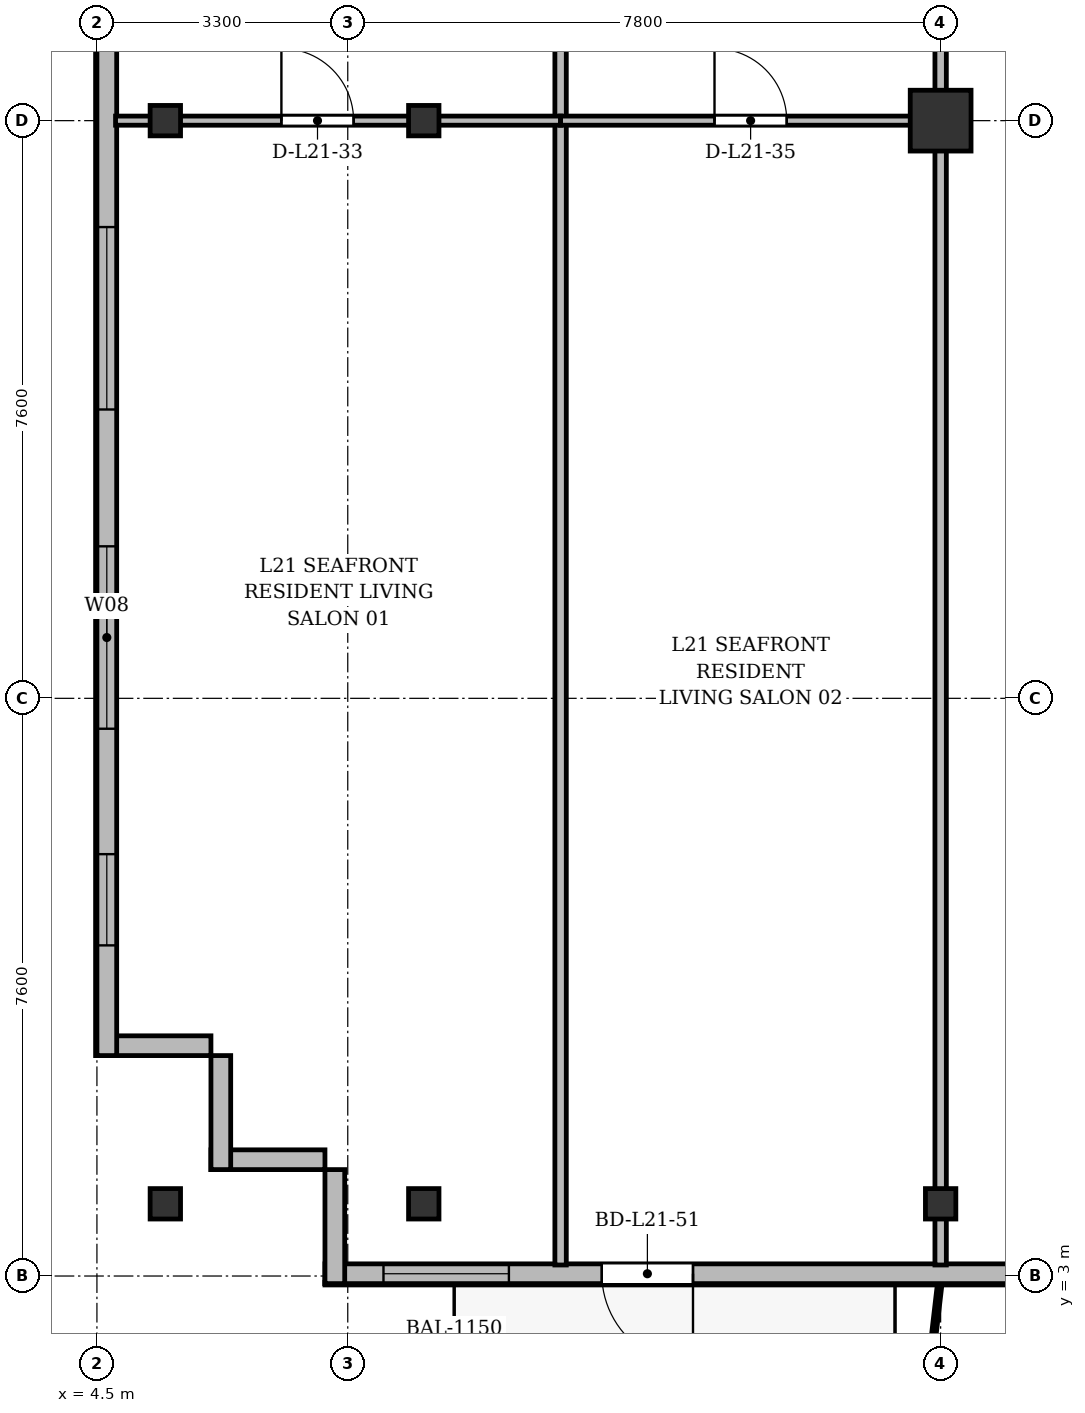
"""IFC4 building model, lengths in metres.
Left out: names, types, materials, properties, quantities, classifications, styles, units other than length and angle.
Written with IfcOpenShell. Run it as: python <this file> out.ifc"""

import sys

from ifc_helpers import new_model, si_unit, direction, frame, frame_2d, origin, origin_2d, place, context, subcontext, project, spatial, rectangle, i_section, extrude, source, transform, mapped, element, fill, save


model = new_model("IFC4")
c1 = context("Model", 3, precision=1e-05, world=origin(), true_north=direction((0.0, 1.0)))
c2 = subcontext(c1, "Body", "Model", "MODEL_VIEW")
j1 = project(units=[si_unit("LENGTHUNIT", "METRE"), si_unit("PLANEANGLEUNIT", "RADIAN")], contexts=[c1])
p1 = place(None, origin())
s1 = spatial("IfcSite", under=j1, at=p1, CompositionType="ELEMENT")
p2 = place(p1, origin())
s2 = spatial("IfcBuilding", under=s1, at=p2, CompositionType="ELEMENT")
p3 = place(p2, frame((0.0, 0.0, 85.3)))
s3 = spatial("IfcBuildingStorey", under=s2, at=p3, CompositionType="ELEMENT", Elevation=85.3)
m1 = source(origin(), c2, "Body", "SweptSolid", [
    extrude(i_section(OverallWidth=0.4, OverallDepth=0.4, WebThickness=0.022, FlangeThickness=0.035, at=origin_2d()), origin(), (0.0, 0.0, 1.0), 3.6),
])
for number, where, z_axis, x_axis in (
    (1, (5.4, 3.95, 0.0), (0.0, 0.0, 1.0), (1.0, 0.0, 0.0)),
    (2, (5.4, 18.2, 0.0), (0.0, 0.0, 1.0), (1.0, 0.0, 0.0)),
    (3, (8.8, 3.95, 0.0), (0.0, 0.0, 1.0), (1.0, 0.0, 0.0)),
    (4, (8.8, 18.2, 0.0), (0.0, 0.0, 1.0), (1.0, 0.0, 0.0)),
    (5, (15.6, 3.95, 0.0), (0.0, 0.0, 1.0), (1.0, 0.0, 0.0)),
):
    element("IfcColumn", number, at=place(p3, frame(where, z_axis=z_axis, x_axis=x_axis)), inside=s3, PredefinedType="COLUMN", context=c2, shape_type="MappedRepresentation", body=[
        mapped(m1, transform((0.0, 0.0, 0.0), x_axis=(1.0, 0.0, 0.0), y_axis=(0.0, 1.0, 0.0), z_axis=(0.0, 0.0, 1.0), scale=1.0)),
    ])
m2 = source(origin(), c2, "Body", "SweptSolid", [
    extrude(rectangle(XDim=0.8, YDim=0.8, at=origin_2d()), origin(), (0.0, 0.0, 1.0), 3.6),
])
p4 = place(p3, frame((15.6, 18.2, 0.0), z_axis=(0.0, 0.0, 1.0), x_axis=(1.0, 0.0, 0.0)))
e6 = element("IfcColumn", 6, at=p4, inside=s3, PredefinedType="COLUMN", context=c2, shape_type="MappedRepresentation", body=[
    mapped(m2, transform((0.0, 0.0, 0.0), x_axis=(1.0, 0.0, 0.0), y_axis=(0.0, 1.0, 0.0), z_axis=(0.0, 0.0, 1.0), scale=1.0)),
])
for number, where, z_axis, x_axis in (
    (7, (7.5, 4.53, 0.0), (0.0, 0.0, 1.0), (-1.0, 0.0, 0.0)),
    (8, (6.13, 4.4, 0.0), (0.0, 0.0, 1.0), (0.0, 1.0, 0.0)),
):
    element("IfcWall", number, at=place(p3, frame(where, z_axis=z_axis, x_axis=x_axis)), inside=s3, PredefinedType="SOLIDWALL", context=c2, shape_type="SweptSolid", body=[
        extrude(rectangle(XDim=1.5, YDim=0.26, at=frame_2d((0.75, 0.0))), origin(), (0.0, 0.0, 1.0), 3.34),
    ])
p5 = place(p3, frame((6.0, 6.03, 0.0), z_axis=(0.0, 0.0, 1.0), x_axis=(-1.0, 0.0, 0.0)))
e9 = element("IfcWall", 9, at=p5, inside=s3, PredefinedType="SOLIDWALL", context=c2, shape_type="SweptSolid", body=[
    extrude(rectangle(XDim=1.5, YDim=0.26, at=frame_2d((0.75, 0.0))), origin(), (0.0, 0.0, 1.0), 2.84),
])
p6 = place(p3, frame((4.63, 5.9, 0.0), z_axis=(0.0, 0.0, 1.0), x_axis=(0.0, 1.0, 0.0)))
e10 = element("IfcWall", 10, at=p6, inside=s3, PredefinedType="SOLIDWALL", context=c2, shape_type="SweptSolid", body=[
    extrude(rectangle(XDim=39.6, YDim=0.26, at=frame_2d((19.8, 0.0))), origin(), (0.0, 0.0, 1.0), 3.34),
])
p7 = place(p6, frame((1.45, 0.0, 0.92)))
e11 = element("IfcOpeningElement", 11, at=p7, cuts=e10, PredefinedType="OPENING", context=c2, shape_type="SweptSolid", body=[
    extrude(rectangle(XDim=1.2, YDim=1.65, at=frame_2d((0.6, 0.825))), frame((0.0, 0.14, 0.0), z_axis=(0.0, -1.0, 0.0), x_axis=(1.0, 0.0, 0.0)), (0.0, 0.0, 1.0), 0.28),
])
p8 = place(p6, frame((4.3, 0.0, 0.92)))
e12 = element("IfcOpeningElement", 12, at=p8, cuts=e10, PredefinedType="OPENING", context=c2, shape_type="SweptSolid", body=[
    extrude(rectangle(XDim=2.4, YDim=2.1, at=frame_2d((1.2, 1.05))), frame((0.0, 0.14, 0.0), z_axis=(0.0, -1.0, 0.0), x_axis=(1.0, 0.0, 0.0)), (0.0, 0.0, 1.0), 0.28),
])
p9 = place(p6, frame((8.5, 0.0, 0.92)))
e13 = element("IfcOpeningElement", 13, at=p9, cuts=e10, PredefinedType="OPENING", context=c2, shape_type="SweptSolid", body=[
    extrude(rectangle(XDim=2.4, YDim=2.1, at=frame_2d((1.2, 1.05))), frame((0.0, 0.14, 0.0), z_axis=(0.0, -1.0, 0.0), x_axis=(1.0, 0.0, 0.0)), (0.0, 0.0, 1.0), 0.28),
])
p10 = place(p6, frame((15.7, 0.0, 0.92)))
e14 = element("IfcOpeningElement", 14, at=p10, cuts=e10, PredefinedType="OPENING", context=c2, shape_type="SweptSolid", body=[
    extrude(rectangle(XDim=2.4, YDim=2.1, at=frame_2d((1.2, 1.05))), frame((0.0, 0.14, 0.0), z_axis=(0.0, -1.0, 0.0), x_axis=(1.0, 0.0, 0.0)), (0.0, 0.0, 1.0), 0.28),
])
p11 = place(p6, frame((29.7, 0.0, 0.92)))
e15 = element("IfcOpeningElement", 15, at=p11, cuts=e10, PredefinedType="OPENING", context=c2, shape_type="SweptSolid", body=[
    extrude(rectangle(XDim=2.4, YDim=2.1, at=frame_2d((1.2, 1.05))), frame((0.0, 0.14, 0.0), z_axis=(0.0, -1.0, 0.0), x_axis=(1.0, 0.0, 0.0)), (0.0, 0.0, 1.0), 0.28),
])
p12 = place(p6, frame((37.25, 0.0, 0.92)))
e16 = element("IfcOpeningElement", 16, at=p12, cuts=e10, PredefinedType="OPENING", context=c2, shape_type="SweptSolid", body=[
    extrude(rectangle(XDim=1.2, YDim=1.65, at=frame_2d((0.6, 0.825))), frame((0.0, 0.14, 0.0), z_axis=(0.0, -1.0, 0.0), x_axis=(1.0, 0.0, 0.0)), (0.0, 0.0, 1.0), 0.28),
])
p13 = place(p3, frame((66.9, 3.03, 0.0), z_axis=(0.0, 0.0, 1.0), x_axis=(-1.0, 0.0, 0.0)))
e17 = element("IfcWall", 17, at=p13, inside=s3, PredefinedType="SOLIDWALL", context=c2, shape_type="SweptSolid", body=[
    extrude(rectangle(XDim=59.4, YDim=0.26, at=frame_2d((29.7, 0.0))), origin(), (0.0, 0.0, 1.0), 3.34),
])
p14 = place(p13, frame((0.595, 0.0, 0.9)))
e18 = element("IfcOpeningElement", 18, at=p14, cuts=e17, PredefinedType="OPENING", context=c2, shape_type="SweptSolid", body=[
    extrude(rectangle(XDim=2.2, YDim=1.8, at=frame_2d((1.1, 0.9))), frame((0.0, 0.14, 0.0), z_axis=(0.0, -1.0, 0.0), x_axis=(1.0, 0.0, 0.0)), (0.0, 0.0, 1.0), 0.28),
])
p15 = place(p13, frame((4.95, 0.0, 0.9)))
e19 = element("IfcOpeningElement", 19, at=p15, cuts=e17, PredefinedType="OPENING", context=c2, shape_type="SweptSolid", body=[
    extrude(rectangle(XDim=1.5, YDim=1.75, at=frame_2d((0.75, 0.875))), frame((0.0, 0.14, 0.0), z_axis=(0.0, -1.0, 0.0), x_axis=(1.0, 0.0, 0.0)), (0.0, 0.0, 1.0), 0.28),
])
p16 = place(p13, frame((9.18, 0.0, 0.0)))
e20 = element("IfcOpeningElement", 20, at=p16, cuts=e17, PredefinedType="OPENING", context=c2, shape_type="SweptSolid", body=[
    extrude(rectangle(XDim=1.2, YDim=2.2, at=frame_2d((0.6, 1.1))), frame((0.0, 0.14, 0.0), z_axis=(0.0, -1.0, 0.0), x_axis=(1.0, 0.0, 0.0)), (0.0, 0.0, 1.0), 0.28),
])
p17 = place(p13, frame((13.125, 0.0, 0.9)))
e21 = element("IfcOpeningElement", 21, at=p17, cuts=e17, PredefinedType="OPENING", context=c2, shape_type="SweptSolid", body=[
    extrude(rectangle(XDim=1.65, YDim=1.85, at=frame_2d((0.825, 0.925))), frame((0.0, 0.14, 0.0), z_axis=(0.0, -1.0, 0.0), x_axis=(1.0, 0.0, 0.0)), (0.0, 0.0, 1.0), 0.28),
])
p18 = place(p13, frame((16.2, 0.0, 0.9)))
e22 = element("IfcOpeningElement", 22, at=p18, cuts=e17, PredefinedType="OPENING", context=c2, shape_type="SweptSolid", body=[
    extrude(rectangle(XDim=1.8, YDim=1.8, at=frame_2d((0.9, 0.9))), frame((0.0, 0.14, 0.0), z_axis=(0.0, -1.0, 0.0), x_axis=(1.0, 0.0, 0.0)), (0.0, 0.0, 1.0), 0.28),
])
p19 = place(p13, frame((18.75, 0.0, 0.9)))
e23 = element("IfcOpeningElement", 23, at=p19, cuts=e17, PredefinedType="OPENING", context=c2, shape_type="SweptSolid", body=[
    extrude(rectangle(XDim=1.5, YDim=1.75, at=frame_2d((0.75, 0.875))), frame((0.0, 0.14, 0.0), z_axis=(0.0, -1.0, 0.0), x_axis=(1.0, 0.0, 0.0)), (0.0, 0.0, 1.0), 0.28),
])
p20 = place(p13, frame((21.15, 0.0, 0.9)))
e24 = element("IfcOpeningElement", 24, at=p20, cuts=e17, PredefinedType="OPENING", context=c2, shape_type="SweptSolid", body=[
    extrude(rectangle(XDim=1.5, YDim=1.75, at=frame_2d((0.75, 0.875))), frame((0.0, 0.14, 0.0), z_axis=(0.0, -1.0, 0.0), x_axis=(1.0, 0.0, 0.0)), (0.0, 0.0, 1.0), 0.28),
])
p21 = place(p13, frame((23.85, 0.0, 0.9)))
e25 = element("IfcOpeningElement", 25, at=p21, cuts=e17, PredefinedType="OPENING", context=c2, shape_type="SweptSolid", body=[
    extrude(rectangle(XDim=2.0, YDim=1.95, at=frame_2d((1.0, 0.975))), frame((0.0, 0.14, 0.0), z_axis=(0.0, -1.0, 0.0), x_axis=(1.0, 0.0, 0.0)), (0.0, 0.0, 1.0), 0.28),
])
p22 = place(p13, frame((27.525, 0.0, 0.9)))
e26 = element("IfcOpeningElement", 26, at=p22, cuts=e17, PredefinedType="OPENING", context=c2, shape_type="SweptSolid", body=[
    extrude(rectangle(XDim=1.65, YDim=1.85, at=frame_2d((0.825, 0.925))), frame((0.0, 0.14, 0.0), z_axis=(0.0, -1.0, 0.0), x_axis=(1.0, 0.0, 0.0)), (0.0, 0.0, 1.0), 0.28),
])
p23 = place(p13, frame((32.3, 0.0, 0.9)))
e27 = element("IfcOpeningElement", 27, at=p23, cuts=e17, PredefinedType="OPENING", context=c2, shape_type="SweptSolid", body=[
    extrude(rectangle(XDim=1.8, YDim=1.8, at=frame_2d((0.9, 0.9))), frame((0.0, 0.14, 0.0), z_axis=(0.0, -1.0, 0.0), x_axis=(1.0, 0.0, 0.0)), (0.0, 0.0, 1.0), 0.28),
])
p24 = place(p13, frame((40.301, 0.0, 0.0)))
e28 = element("IfcOpeningElement", 28, at=p24, cuts=e17, PredefinedType="OPENING", context=c2, shape_type="SweptSolid", body=[
    extrude(rectangle(XDim=1.2, YDim=2.2, at=frame_2d((0.6, 1.1))), frame((0.0, 0.14, 0.0), z_axis=(0.0, -1.0, 0.0), x_axis=(1.0, 0.0, 0.0)), (0.0, 0.0, 1.0), 0.28),
])
p25 = place(p13, frame((46.65, 0.0, 0.9)))
e29 = element("IfcOpeningElement", 29, at=p25, cuts=e17, PredefinedType="OPENING", context=c2, shape_type="SweptSolid", body=[
    extrude(rectangle(XDim=1.5, YDim=1.75, at=frame_2d((0.75, 0.875))), frame((0.0, 0.14, 0.0), z_axis=(0.0, -1.0, 0.0), x_axis=(1.0, 0.0, 0.0)), (0.0, 0.0, 1.0), 0.28),
])
p26 = place(p13, frame((54.558, 0.0, 0.0)))
e30 = element("IfcOpeningElement", 30, at=p26, cuts=e17, PredefinedType="OPENING", context=c2, shape_type="SweptSolid", body=[
    extrude(rectangle(XDim=1.2, YDim=2.2, at=frame_2d((0.6, 1.1))), frame((0.0, 0.14, 0.0), z_axis=(0.0, -1.0, 0.0), x_axis=(1.0, 0.0, 0.0)), (0.0, 0.0, 1.0), 0.28),
])
p27 = place(p13, frame((56.98, 0.0, 0.9)))
e31 = element("IfcOpeningElement", 31, at=p27, cuts=e17, PredefinedType="OPENING", context=c2, shape_type="SweptSolid", body=[
    extrude(rectangle(XDim=1.65, YDim=1.85, at=frame_2d((0.825, 0.925))), frame((0.0, 0.14, 0.0), z_axis=(0.0, -1.0, 0.0), x_axis=(1.0, 0.0, 0.0)), (0.0, 0.0, 1.0), 0.28),
])
p28 = place(p3, frame((7.63, 2.9, 0.0), z_axis=(0.0, 0.0, 1.0), x_axis=(0.0, 1.0, 0.0)))
e32 = element("IfcWall", 32, at=p28, inside=s3, PredefinedType="SOLIDWALL", context=c2, shape_type="SweptSolid", body=[
    extrude(rectangle(XDim=1.5, YDim=0.26, at=frame_2d((0.75, 0.0))), origin(), (0.0, 0.0, 1.0), 2.752),
])
p29 = place(p3, frame((10.6, 3.145, 0.0), z_axis=(0.0, 0.0, 1.0), x_axis=(0.0, 1.0, 0.0)))
e33 = element("IfcWall", 33, at=p29, inside=s3, PredefinedType="PARTITIONING", context=c2, shape_type="SweptSolid", body=[
    extrude(rectangle(XDim=24.455, YDim=0.15, at=frame_2d((12.228, 0.0))), origin(), (0.0, 0.0, 1.0), 2.752),
])
p30 = place(p3, frame((15.6, 3.145, 0.0), z_axis=(0.0, 0.0, 1.0), x_axis=(0.0, 1.0, 0.0)))
e34 = element("IfcWall", 34, at=p30, inside=s3, PredefinedType="PARTITIONING", context=c2, shape_type="SweptSolid", body=[
    extrude(rectangle(XDim=24.455, YDim=0.15, at=frame_2d((12.228, 0.0))), origin(), (0.0, 0.0, 1.0), 2.84),
])
p31 = place(p3, frame((4.745, 18.2, 0.0), z_axis=(0.0, 0.0, 1.0), x_axis=(1.0, 0.0, 0.0)))
e35 = element("IfcWall", 35, at=p31, inside=s3, PredefinedType="PARTITIONING", context=c2, shape_type="SweptSolid", body=[
    extrude(rectangle(XDim=5.855, YDim=0.12, at=frame_2d((2.927, 0.0))), origin(), (0.0, 0.0, 1.0), 2.752),
])
p32 = place(p31, frame((2.182, 0.0, 0.0)))
e36 = element("IfcOpeningElement", 36, at=p32, cuts=e35, PredefinedType="OPENING", context=c2, shape_type="SweptSolid", body=[
    extrude(rectangle(XDim=0.95, YDim=2.15, at=frame_2d((0.475, 1.075))), frame((0.0, 0.07, 0.0), z_axis=(0.0, -1.0, 0.0), x_axis=(1.0, 0.0, 0.0)), (0.0, 0.0, 1.0), 0.14),
])
p33 = place(p3, frame((10.6, 18.2, 0.0), z_axis=(0.0, 0.0, 1.0), x_axis=(1.0, 0.0, 0.0)))
e37 = element("IfcWall", 37, at=p33, inside=s3, PredefinedType="PARTITIONING", context=c2, shape_type="SweptSolid", body=[
    extrude(rectangle(XDim=5.0, YDim=0.12, at=frame_2d((2.5, 0.0))), origin(), (0.0, 0.0, 1.0), 2.752),
])
p34 = place(p33, frame((2.025, 0.0, 0.0)))
e38 = element("IfcOpeningElement", 38, at=p34, cuts=e37, PredefinedType="OPENING", context=c2, shape_type="SweptSolid", body=[
    extrude(rectangle(XDim=0.95, YDim=2.15, at=frame_2d((0.475, 1.075))), frame((0.0, 0.07, 0.0), z_axis=(0.0, -1.0, 0.0), x_axis=(1.0, 0.0, 0.0)), (0.0, 0.0, 1.0), 0.14),
])
m3 = source(origin(), c2, "Body", "SweptSolid", [
    extrude(rectangle(XDim=1.2, YDim=1.65, at=frame_2d((0.6, 0.825))), frame((0.0, 0.03, 0.0), z_axis=(0.0, -1.0, 0.0), x_axis=(1.0, 0.0, 0.0)), (0.0, 0.0, 1.0), 0.06),
])
p35 = place(p7, origin())
e39 = element("IfcWindow", 39, at=p35, inside=s3, PartitioningType="SINGLE_PANEL", PredefinedType="WINDOW", context=c2, shape_type="MappedRepresentation", body=[
    mapped(m3, transform((0.0, 0.0, 0.0), x_axis=(1.0, 0.0, 0.0), y_axis=(0.0, 1.0, 0.0), z_axis=(0.0, 0.0, 1.0), scale=1.0)),
])
fill(e11, e39)
m4 = source(origin(), c2, "Body", "SweptSolid", [
    extrude(rectangle(XDim=2.4, YDim=2.1, at=frame_2d((1.2, 1.05))), frame((0.0, 0.03, 0.0), z_axis=(0.0, -1.0, 0.0), x_axis=(1.0, 0.0, 0.0)), (0.0, 0.0, 1.0), 0.06),
])
p36 = place(p8, origin())
e40 = element("IfcWindow", 40, at=p36, inside=s3, PartitioningType="SINGLE_PANEL", PredefinedType="WINDOW", context=c2, shape_type="MappedRepresentation", body=[
    mapped(m4, transform((0.0, 0.0, 0.0), x_axis=(1.0, 0.0, 0.0), y_axis=(0.0, 1.0, 0.0), z_axis=(0.0, 0.0, 1.0), scale=1.0)),
])
fill(e12, e40)
p37 = place(p9, origin())
e41 = element("IfcWindow", 41, at=p37, inside=s3, PartitioningType="SINGLE_PANEL", PredefinedType="WINDOW", context=c2, shape_type="MappedRepresentation", body=[
    mapped(m4, transform((0.0, 0.0, 0.0), x_axis=(1.0, 0.0, 0.0), y_axis=(0.0, 1.0, 0.0), z_axis=(0.0, 0.0, 1.0), scale=1.0)),
])
fill(e13, e41)
m5 = source(origin(), c2, "Body", "SweptSolid", [
    extrude(rectangle(XDim=1.2, YDim=2.2, at=frame_2d((0.6, 1.1))), frame((0.0, 0.025, 0.0), z_axis=(0.0, -1.0, 0.0), x_axis=(1.0, 0.0, 0.0)), (0.0, 0.0, 1.0), 0.05),
])
p38 = place(p26, origin())
e42 = element("IfcDoor", 42, at=p38, inside=s3, OperationType="SINGLE_SWING_LEFT", PredefinedType="DOOR", context=c2, shape_type="MappedRepresentation", body=[
    mapped(m5, transform((0.0, 0.0, 0.0), x_axis=(1.0, 0.0, 0.0), y_axis=(0.0, 1.0, 0.0), z_axis=(0.0, 0.0, 1.0), scale=1.0)),
])
fill(e30, e42)
m6 = source(origin(), c2, "Body", "SweptSolid", [
    extrude(rectangle(XDim=1.65, YDim=1.85, at=frame_2d((0.825, 0.925))), frame((0.0, 0.03, 0.0), z_axis=(0.0, -1.0, 0.0), x_axis=(1.0, 0.0, 0.0)), (0.0, 0.0, 1.0), 0.06),
])
p39 = place(p27, origin())
e43 = element("IfcWindow", 43, at=p39, inside=s3, PartitioningType="SINGLE_PANEL", PredefinedType="WINDOW", context=c2, shape_type="MappedRepresentation", body=[
    mapped(m6, transform((0.0, 0.0, 0.0), x_axis=(1.0, 0.0, 0.0), y_axis=(0.0, 1.0, 0.0), z_axis=(0.0, 0.0, 1.0), scale=1.0)),
])
fill(e31, e43)
m7 = source(origin(), c2, "Body", "SweptSolid", [
    extrude(rectangle(XDim=0.95, YDim=2.15, at=frame_2d((0.475, 1.075))), frame((0.0, 0.025, 0.0), z_axis=(0.0, -1.0, 0.0), x_axis=(1.0, 0.0, 0.0)), (0.0, 0.0, 1.0), 0.05),
])
p40 = place(p32, origin())
e44 = element("IfcDoor", 44, at=p40, inside=s3, OperationType="SINGLE_SWING_LEFT", PredefinedType="DOOR", context=c2, shape_type="MappedRepresentation", body=[
    mapped(m7, transform((0.0, 0.0, 0.0), x_axis=(1.0, 0.0, 0.0), y_axis=(0.0, 1.0, 0.0), z_axis=(0.0, 0.0, 1.0), scale=1.0)),
])
fill(e36, e44)
p41 = place(p34, origin())
e45 = element("IfcDoor", 45, at=p41, inside=s3, OperationType="SINGLE_SWING_LEFT", PredefinedType="DOOR", context=c2, shape_type="MappedRepresentation", body=[
    mapped(m7, transform((0.0, 0.0, 0.0), x_axis=(1.0, 0.0, 0.0), y_axis=(0.0, 1.0, 0.0), z_axis=(0.0, 0.0, 1.0), scale=1.0)),
])
fill(e38, e45)
save(model, sys.argv[1])
